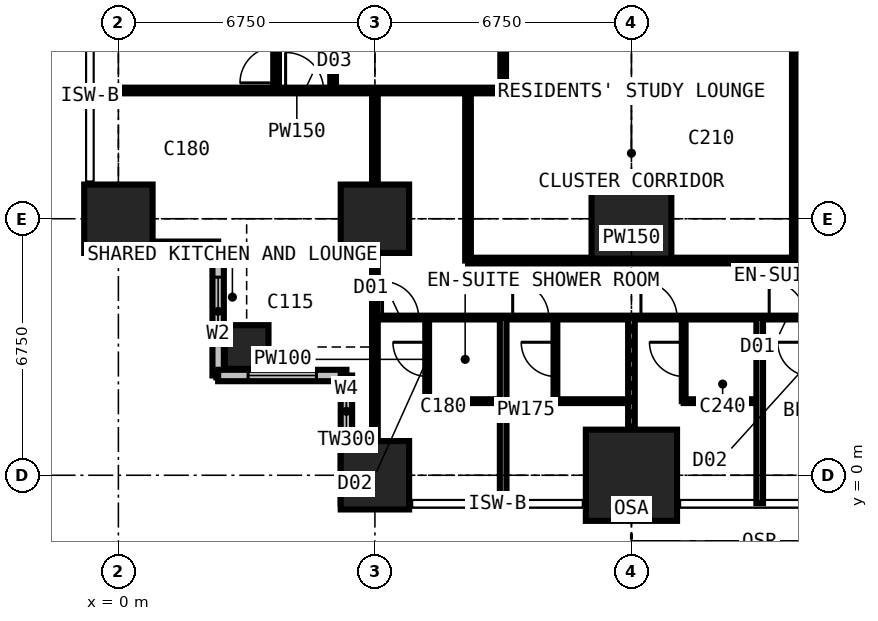
"""IFC4 building model, lengths in metres.
Left out: names, types, materials, properties, quantities, classifications, styles, units other than length and angle.
Written with IfcOpenShell. Run it as: python <this file> out.ifc"""

import sys

from ifc_helpers import new_model, si_unit, direction, frame, frame_2d, origin, origin_2d, place, context, subcontext, project, spatial, rectangle, extrude, element, fill, save


model = new_model("IFC4")
c1 = context("Model", 3, precision=1e-05, world=origin(), true_north=direction((0.0, 1.0)))
c2 = subcontext(c1, "Body", "Model", "MODEL_VIEW")
j1 = project(units=[si_unit("LENGTHUNIT", "METRE"), si_unit("PLANEANGLEUNIT", "RADIAN")], contexts=[c1])
p1 = place(None, origin())
s1 = spatial("IfcSite", under=j1, at=p1, CompositionType="ELEMENT")
p2 = place(p1, origin())
s2 = spatial("IfcBuilding", under=s1, at=p2, CompositionType="ELEMENT")
p3 = place(p2, frame((0.0, 0.0, 83.7)))
s3 = spatial("IfcBuildingStorey", under=s2, at=p3, CompositionType="ELEMENT", Elevation=83.7)
p4 = place(p3, frame((0.0, 6.75, 0.0), z_axis=(0.0, 0.0, 1.0), x_axis=(1.0, 0.0, 0.0)))
e1 = element("IfcColumn", 1, at=p4, inside=s3, PredefinedType="COLUMN", context=c2, shape_type="SweptSolid", body=[
    extrude(rectangle(XDim=1.8, YDim=1.8, at=origin_2d()), origin(), (0.0, 0.0, 1.0), 3.6),
])
p5 = place(p3, frame((3.375, 3.375, 0.0), z_axis=(0.0, 0.0, 1.0), x_axis=(1.0, 0.0, 0.0)))
e2 = element("IfcColumn", 2, at=p5, inside=s3, PredefinedType="COLUMN", context=c2, shape_type="SweptSolid", body=[
    extrude(rectangle(XDim=1.15, YDim=1.15, at=origin_2d()), origin(), (0.0, 0.0, 1.0), 3.6),
])
for number, where, z_axis, x_axis in (
    (3, (6.75, 0.0, 0.0), (0.0, 0.0, 1.0), (1.0, 0.0, 0.0)),
    (4, (6.75, 6.75, 0.0), (0.0, 0.0, 1.0), (1.0, 0.0, 0.0)),
):
    element("IfcColumn", number, at=place(p3, frame(where, z_axis=z_axis, x_axis=x_axis)), inside=s3, PredefinedType="COLUMN", context=c2, shape_type="SweptSolid", body=[
        extrude(rectangle(XDim=1.8, YDim=1.8, at=origin_2d()), origin(), (0.0, 0.0, 1.0), 3.6),
    ])
p6 = place(p3, frame((13.5, 0.0, 0.0), z_axis=(0.0, 0.0, 1.0), x_axis=(1.0, 0.0, 0.0)))
e5 = element("IfcColumn", 5, at=p6, inside=s3, PredefinedType="COLUMN", context=c2, shape_type="SweptSolid", body=[
    extrude(rectangle(XDim=2.4, YDim=2.4, at=origin_2d()), origin(), (0.0, 0.0, 1.0), 3.6),
])
p7 = place(p3, frame((13.5, 6.75, 0.0), z_axis=(0.0, 0.0, 1.0), x_axis=(1.0, 0.0, 0.0)))
e6 = element("IfcColumn", 6, at=p7, inside=s3, PredefinedType="COLUMN", context=c2, shape_type="SweptSolid", body=[
    extrude(rectangle(XDim=2.1, YDim=2.1, at=origin_2d()), origin(), (0.0, 0.0, 1.0), 3.6),
])
p8 = place(p3, frame((-0.75, 6.0, 0.0), z_axis=(0.0, 0.0, 1.0), x_axis=(1.0, 0.0, 0.0)))
e7 = element("IfcWall", 7, at=p8, inside=s3, PredefinedType="SOLIDWALL", context=c2, shape_type="SweptSolid", body=[
    extrude(rectangle(XDim=3.375, YDim=0.3, at=frame_2d((1.688, 0.0))), origin(), (0.0, 0.0, 1.0), 3.375),
])
p9 = place(p8, frame((1.833, 0.0, 0.9)))
e8 = element("IfcOpeningElement", 8, at=p9, cuts=e7, PredefinedType="OPENING", context=c2, shape_type="SweptSolid", body=[
    extrude(rectangle(XDim=1.2, YDim=1.8, at=frame_2d((0.6, 0.9))), frame((0.0, 0.16, 0.0), z_axis=(0.0, -1.0, 0.0), x_axis=(1.0, 0.0, 0.0)), (0.0, 0.0, 1.0), 0.32),
])
p10 = place(p3, frame((2.625, 6.0, 0.0), z_axis=(0.0, 0.0, 1.0), x_axis=(0.0, -1.0, 0.0)))
e9 = element("IfcWall", 9, at=p10, inside=s3, PredefinedType="SOLIDWALL", context=c2, shape_type="SweptSolid", body=[
    extrude(rectangle(XDim=3.375, YDim=0.3, at=frame_2d((1.688, 0.0))), origin(), (0.0, 0.0, 1.0), 3.375),
])
p11 = place(p10, frame((0.788, 0.0, 0.6)))
e10 = element("IfcOpeningElement", 10, at=p11, cuts=e9, PredefinedType="OPENING", context=c2, shape_type="SweptSolid", body=[
    extrude(rectangle(XDim=1.8, YDim=2.1, at=frame_2d((0.9, 1.05))), frame((0.0, 0.16, 0.0), z_axis=(0.0, -1.0, 0.0), x_axis=(1.0, 0.0, 0.0)), (0.0, 0.0, 1.0), 0.32),
])
p12 = place(p3, frame((2.625, 2.625, 0.0), z_axis=(0.0, 0.0, 1.0), x_axis=(1.0, 0.0, 0.0)))
e11 = element("IfcWall", 11, at=p12, inside=s3, PredefinedType="SOLIDWALL", context=c2, shape_type="SweptSolid", body=[
    extrude(rectangle(XDim=3.375, YDim=0.3, at=frame_2d((1.688, 0.0))), origin(), (0.0, 0.0, 1.0), 3.375),
])
p13 = place(p12, frame((0.788, 0.0, 0.6)))
e12 = element("IfcOpeningElement", 12, at=p13, cuts=e11, PredefinedType="OPENING", context=c2, shape_type="SweptSolid", body=[
    extrude(rectangle(XDim=1.8, YDim=2.1, at=frame_2d((0.9, 1.05))), frame((0.0, 0.16, 0.0), z_axis=(0.0, -1.0, 0.0), x_axis=(1.0, 0.0, 0.0)), (0.0, 0.0, 1.0), 0.32),
])
p14 = place(p3, frame((6.0, 2.625, 0.0), z_axis=(0.0, 0.0, 1.0), x_axis=(0.0, -1.0, 0.0)))
e13 = element("IfcWall", 13, at=p14, inside=s3, PredefinedType="SOLIDWALL", context=c2, shape_type="SweptSolid", body=[
    extrude(rectangle(XDim=3.375, YDim=0.3, at=frame_2d((1.688, 0.0))), origin(), (0.0, 0.0, 1.0), 3.375),
])
p15 = place(p14, frame((0.343, 0.0, 0.9)))
e14 = element("IfcOpeningElement", 14, at=p15, cuts=e13, PredefinedType="OPENING", context=c2, shape_type="SweptSolid", body=[
    extrude(rectangle(XDim=1.2, YDim=1.8, at=frame_2d((0.6, 0.9))), frame((0.0, 0.16, 0.0), z_axis=(0.0, -1.0, 0.0), x_axis=(1.0, 0.0, 0.0)), (0.0, 0.0, 1.0), 0.32),
])
p16 = place(p3, frame((-0.734, 10.125, 0.0), z_axis=(0.0, 0.0, 1.0), x_axis=(1.0, 0.0, 0.0)))
e15 = element("IfcWall", 15, at=p16, inside=s3, PredefinedType="PARTITIONING", context=c2, shape_type="SweptSolid", body=[
    extrude(rectangle(XDim=10.859, YDim=0.15, at=frame_2d((5.429, 0.0))), origin(), (0.0, 0.0, 1.0), 3.375),
])
p17 = place(p16, frame((5.134, 0.0, 0.0)))
e16 = element("IfcOpeningElement", 16, at=p17, cuts=e15, PredefinedType="OPENING", context=c2, shape_type="SweptSolid", body=[
    extrude(rectangle(XDim=1.0, YDim=2.2, at=frame_2d((0.5, 1.1))), frame((0.0, 0.085, 0.0), z_axis=(0.0, -1.0, 0.0), x_axis=(1.0, 0.0, 0.0)), (0.0, 0.0, 1.0), 0.17),
])
p18 = place(p3, frame((4.15, 10.125, 0.0), z_axis=(0.0, 0.0, 1.0), x_axis=(0.0, 1.0, 0.0)))
e17 = element("IfcWall", 17, at=p18, inside=s3, PredefinedType="PARTITIONING", context=c2, shape_type="SweptSolid", body=[
    extrude(rectangle(XDim=16.875, YDim=0.15, at=frame_2d((8.438, 0.0))), origin(), (0.0, 0.0, 1.0), 3.375),
])
p19 = place(p18, frame((13.7, 0.0, 0.0)))
e18 = element("IfcOpeningElement", 18, at=p19, cuts=e17, PredefinedType="OPENING", context=c2, shape_type="SweptSolid", body=[
    extrude(rectangle(XDim=0.95, YDim=2.2, at=frame_2d((0.475, 1.1))), frame((0.0, 0.085, 0.0), z_axis=(0.0, -1.0, 0.0), x_axis=(1.0, 0.0, 0.0)), (0.0, 0.0, 1.0), 0.17),
])
p20 = place(p18, frame((7.575, 0.0, 0.0)))
e19 = element("IfcOpeningElement", 19, at=p20, cuts=e17, PredefinedType="OPENING", context=c2, shape_type="SweptSolid", body=[
    extrude(rectangle(XDim=0.95, YDim=2.2, at=frame_2d((0.475, 1.1))), frame((0.0, 0.085, 0.0), z_axis=(0.0, -1.0, 0.0), x_axis=(1.0, 0.0, 0.0)), (0.0, 0.0, 1.0), 0.17),
])
p21 = place(p18, frame((0.2, 0.0, 0.0)))
e20 = element("IfcOpeningElement", 20, at=p21, cuts=e17, PredefinedType="OPENING", context=c2, shape_type="SweptSolid", body=[
    extrude(rectangle(XDim=0.95, YDim=2.2, at=frame_2d((0.475, 1.1))), frame((0.0, 0.085, 0.0), z_axis=(0.0, -1.0, 0.0), x_axis=(1.0, 0.0, 0.0)), (0.0, 0.0, 1.0), 0.17),
])
p22 = place(p18, frame((10.375, 0.0, 0.0)))
e21 = element("IfcOpeningElement", 21, at=p22, cuts=e17, PredefinedType="OPENING", context=c2, shape_type="SweptSolid", body=[
    extrude(rectangle(XDim=0.95, YDim=2.2, at=frame_2d((0.475, 1.1))), frame((0.0, 0.085, 0.0), z_axis=(0.0, -1.0, 0.0), x_axis=(1.0, 0.0, 0.0)), (0.0, 0.0, 1.0), 0.17),
])
p23 = place(p3, frame((5.65, 10.125, 0.0), z_axis=(0.0, 0.0, 1.0), x_axis=(0.0, 1.0, 0.0)))
e22 = element("IfcWall", 22, at=p23, inside=s3, PredefinedType="PARTITIONING", context=c2, shape_type="SweptSolid", body=[
    extrude(rectangle(XDim=10.762, YDim=0.15, at=frame_2d((5.381, 0.0))), origin(), (0.0, 0.0, 1.0), 3.375),
])
p24 = place(p23, frame((4.9, 0.0, 0.0)))
e23 = element("IfcOpeningElement", 23, at=p24, cuts=e22, PredefinedType="OPENING", context=c2, shape_type="SweptSolid", body=[
    extrude(rectangle(XDim=0.95, YDim=2.2, at=frame_2d((0.475, 1.1))), frame((0.0, 0.085, 0.0), z_axis=(0.0, -1.0, 0.0), x_axis=(1.0, 0.0, 0.0)), (0.0, 0.0, 1.0), 0.17),
])
p25 = place(p3, frame((6.75, -0.734, 0.0), z_axis=(0.0, 0.0, 1.0), x_axis=(0.0, 1.0, 0.0)))
e24 = element("IfcWall", 24, at=p25, inside=s3, PredefinedType="PARTITIONING", context=c2, shape_type="SweptSolid", body=[
    extrude(rectangle(XDim=10.859, YDim=0.15, at=frame_2d((5.429, 0.0))), origin(), (0.0, 0.0, 1.0), 2.877),
])
p26 = place(p3, frame((6.75, 4.15, 0.0), z_axis=(0.0, 0.0, 1.0), x_axis=(1.0, 0.0, 0.0)))
e25 = element("IfcWall", 25, at=p26, inside=s3, PredefinedType="PARTITIONING", context=c2, shape_type="SweptSolid", body=[
    extrude(rectangle(XDim=23.625, YDim=0.1, at=frame_2d((11.812, 0.0))), origin(), (0.0, 0.0, 1.0), 3.375),
])
p27 = place(p26, frame((0.2, 0.0, 0.0)))
e26 = element("IfcOpeningElement", 26, at=p27, cuts=e25, PredefinedType="OPENING", context=c2, shape_type="SweptSolid", body=[
    extrude(rectangle(XDim=0.95, YDim=2.2, at=frame_2d((0.475, 1.1))), frame((0.0, 0.06, 0.0), z_axis=(0.0, -1.0, 0.0), x_axis=(1.0, 0.0, 0.0)), (0.0, 0.0, 1.0), 0.12),
])
p28 = place(p26, frame((3.625, 0.0, 0.0)))
e27 = element("IfcOpeningElement", 27, at=p28, cuts=e25, PredefinedType="OPENING", context=c2, shape_type="SweptSolid", body=[
    extrude(rectangle(XDim=0.95, YDim=2.2, at=frame_2d((0.475, 1.1))), frame((0.0, 0.06, 0.0), z_axis=(0.0, -1.0, 0.0), x_axis=(1.0, 0.0, 0.0)), (0.0, 0.0, 1.0), 0.12),
])
p29 = place(p26, frame((7.0, 0.0, 0.0)))
e28 = element("IfcOpeningElement", 28, at=p29, cuts=e25, PredefinedType="OPENING", context=c2, shape_type="SweptSolid", body=[
    extrude(rectangle(XDim=0.95, YDim=2.2, at=frame_2d((0.475, 1.1))), frame((0.0, 0.06, 0.0), z_axis=(0.0, -1.0, 0.0), x_axis=(1.0, 0.0, 0.0)), (0.0, 0.0, 1.0), 0.12),
])
p30 = place(p26, frame((10.375, 0.0, 0.0)))
e29 = element("IfcOpeningElement", 29, at=p30, cuts=e25, PredefinedType="OPENING", context=c2, shape_type="SweptSolid", body=[
    extrude(rectangle(XDim=0.95, YDim=2.2, at=frame_2d((0.475, 1.1))), frame((0.0, 0.06, 0.0), z_axis=(0.0, -1.0, 0.0), x_axis=(1.0, 0.0, 0.0)), (0.0, 0.0, 1.0), 0.12),
])
p31 = place(p26, frame((15.1, 0.0, 0.0)))
e30 = element("IfcOpeningElement", 30, at=p31, cuts=e25, PredefinedType="OPENING", context=c2, shape_type="SweptSolid", body=[
    extrude(rectangle(XDim=0.95, YDim=2.2, at=frame_2d((0.475, 1.1))), frame((0.0, 0.06, 0.0), z_axis=(0.0, -1.0, 0.0), x_axis=(1.0, 0.0, 0.0)), (0.0, 0.0, 1.0), 0.12),
])
p32 = place(p26, frame((20.5, 0.0, 0.0)))
e31 = element("IfcOpeningElement", 31, at=p32, cuts=e25, PredefinedType="OPENING", context=c2, shape_type="SweptSolid", body=[
    extrude(rectangle(XDim=0.95, YDim=2.2, at=frame_2d((0.475, 1.1))), frame((0.0, 0.06, 0.0), z_axis=(0.0, -1.0, 0.0), x_axis=(1.0, 0.0, 0.0)), (0.0, 0.0, 1.0), 0.12),
])
p33 = place(p3, frame((8.125, 1.95, 0.0), z_axis=(0.0, 0.0, 1.0), x_axis=(0.0, 1.0, 0.0)))
e32 = element("IfcWall", 32, at=p33, inside=s3, PredefinedType="PARTITIONING", context=c2, shape_type="SweptSolid", body=[
    extrude(rectangle(XDim=2.2, YDim=0.1, at=frame_2d((1.1, 0.0))), origin(), (0.0, 0.0, 1.0), 3.375),
])
p34 = place(p33, frame((0.65, 0.0, 0.0)))
e33 = element("IfcOpeningElement", 33, at=p34, cuts=e32, PredefinedType="OPENING", context=c2, shape_type="SweptSolid", body=[
    extrude(rectangle(XDim=0.9, YDim=2.2, at=frame_2d((0.45, 1.1))), frame((0.0, 0.06, 0.0), z_axis=(0.0, -1.0, 0.0), x_axis=(1.0, 0.0, 0.0)), (0.0, 0.0, 1.0), 0.12),
])
p35 = place(p3, frame((8.125, 1.95, 0.0), z_axis=(0.0, 0.0, 1.0), x_axis=(1.0, 0.0, 0.0)))
e34 = element("IfcWall", 34, at=p35, inside=s3, PredefinedType="PARTITIONING", context=c2, shape_type="SweptSolid", body=[
    extrude(rectangle(XDim=2.0, YDim=0.1, at=frame_2d((1.0, 0.0))), origin(), (0.0, 0.0, 1.0), 3.375),
])
p36 = place(p3, frame((9.2, 5.65, 0.0), z_axis=(0.0, 0.0, 1.0), x_axis=(0.0, 1.0, 0.0)))
e35 = element("IfcWall", 35, at=p36, inside=s3, PredefinedType="PARTITIONING", context=c2, shape_type="SweptSolid", body=[
    extrude(rectangle(XDim=4.475, YDim=0.15, at=frame_2d((2.238, 0.0))), origin(), (0.0, 0.0, 1.0), 3.375),
])
p37 = place(p3, frame((9.2, 5.65, 0.0), z_axis=(0.0, 0.0, 1.0), x_axis=(1.0, 0.0, 0.0)))
e36 = element("IfcWall", 36, at=p37, inside=s3, PredefinedType="PARTITIONING", context=c2, shape_type="SweptSolid", body=[
    extrude(rectangle(XDim=8.6, YDim=0.15, at=frame_2d((4.3, 0.0))), origin(), (0.0, 0.0, 1.0), 3.375),
])
p38 = place(p3, frame((10.125, -0.734, 0.0), z_axis=(0.0, 0.0, 1.0), x_axis=(0.0, 1.0, 0.0)))
e37 = element("IfcWall", 37, at=p38, inside=s3, PredefinedType="PARTITIONING", context=c2, shape_type="SweptSolid", body=[
    extrude(rectangle(XDim=4.884, YDim=0.175, at=frame_2d((2.442, 0.0))), origin(), (0.0, 0.0, 1.0), 3.375),
])
p39 = place(p3, frame((10.125, 10.125, 0.0), z_axis=(0.0, 0.0, 1.0), x_axis=(0.0, 1.0, 0.0)))
e38 = element("IfcWall", 38, at=p39, inside=s3, PredefinedType="PARTITIONING", context=c2, shape_type="SweptSolid", body=[
    extrude(rectangle(XDim=1.175, YDim=0.15, at=frame_2d((0.587, 0.0))), origin(), (0.0, 0.0, 1.0), 3.375),
])
p40 = place(p3, frame((11.5, 1.95, 0.0), z_axis=(0.0, 0.0, 1.0), x_axis=(0.0, 1.0, 0.0)))
e39 = element("IfcWall", 39, at=p40, inside=s3, PredefinedType="PARTITIONING", context=c2, shape_type="SweptSolid", body=[
    extrude(rectangle(XDim=2.2, YDim=0.1, at=frame_2d((1.1, 0.0))), origin(), (0.0, 0.0, 1.0), 3.375),
])
p41 = place(p40, frame((0.65, 0.0, 0.0)))
e40 = element("IfcOpeningElement", 40, at=p41, cuts=e39, PredefinedType="OPENING", context=c2, shape_type="SweptSolid", body=[
    extrude(rectangle(XDim=0.9, YDim=2.2, at=frame_2d((0.45, 1.1))), frame((0.0, 0.06, 0.0), z_axis=(0.0, -1.0, 0.0), x_axis=(1.0, 0.0, 0.0)), (0.0, 0.0, 1.0), 0.12),
])
p42 = place(p3, frame((11.5, 1.95, 0.0), z_axis=(0.0, 0.0, 1.0), x_axis=(1.0, 0.0, 0.0)))
e41 = element("IfcWall", 41, at=p42, inside=s3, PredefinedType="PARTITIONING", context=c2, shape_type="SweptSolid", body=[
    extrude(rectangle(XDim=2.0, YDim=0.1, at=frame_2d((1.0, 0.0))), origin(), (0.0, 0.0, 1.0), 3.375),
])
p43 = place(p3, frame((13.5, -0.734, 0.0), z_axis=(0.0, 0.0, 1.0), x_axis=(0.0, 1.0, 0.0)))
e42 = element("IfcWall", 42, at=p43, inside=s3, PredefinedType="PARTITIONING", context=c2, shape_type="SweptSolid", body=[
    extrude(rectangle(XDim=4.884, YDim=0.175, at=frame_2d((2.442, 0.0))), origin(), (0.0, 0.0, 1.0), 2.61),
])
p44 = place(p3, frame((14.875, 1.95, 0.0), z_axis=(0.0, 0.0, 1.0), x_axis=(0.0, 1.0, 0.0)))
e43 = element("IfcWall", 43, at=p44, inside=s3, PredefinedType="PARTITIONING", context=c2, shape_type="SweptSolid", body=[
    extrude(rectangle(XDim=2.2, YDim=0.1, at=frame_2d((1.1, 0.0))), origin(), (0.0, 0.0, 1.0), 3.375),
])
p45 = place(p44, frame((0.65, 0.0, 0.0)))
e44 = element("IfcOpeningElement", 44, at=p45, cuts=e43, PredefinedType="OPENING", context=c2, shape_type="SweptSolid", body=[
    extrude(rectangle(XDim=0.9, YDim=2.2, at=frame_2d((0.45, 1.1))), frame((0.0, 0.06, 0.0), z_axis=(0.0, -1.0, 0.0), x_axis=(1.0, 0.0, 0.0)), (0.0, 0.0, 1.0), 0.12),
])
p46 = place(p3, frame((14.875, 1.95, 0.0), z_axis=(0.0, 0.0, 1.0), x_axis=(1.0, 0.0, 0.0)))
e45 = element("IfcWall", 45, at=p46, inside=s3, PredefinedType="PARTITIONING", context=c2, shape_type="SweptSolid", body=[
    extrude(rectangle(XDim=2.0, YDim=0.1, at=frame_2d((1.0, 0.0))), origin(), (0.0, 0.0, 1.0), 3.375),
])
p47 = place(p3, frame((16.875, -0.734, 0.0), z_axis=(0.0, 0.0, 1.0), x_axis=(0.0, 1.0, 0.0)))
e46 = element("IfcWall", 46, at=p47, inside=s3, PredefinedType="PARTITIONING", context=c2, shape_type="SweptSolid", body=[
    extrude(rectangle(XDim=4.884, YDim=0.175, at=frame_2d((2.442, 0.0))), origin(), (0.0, 0.0, 1.0), 3.375),
])
p48 = place(p3, frame((17.8, 5.65, 0.0), z_axis=(0.0, 0.0, 1.0), x_axis=(0.0, 1.0, 0.0)))
e47 = element("IfcWall", 47, at=p48, inside=s3, PredefinedType="PARTITIONING", context=c2, shape_type="SweptSolid", body=[
    extrude(rectangle(XDim=5.65, YDim=0.15, at=frame_2d((2.825, 0.0))), origin(), (0.0, 0.0, 1.0), 3.375),
])
p49 = place(p9, origin())
e48 = element("IfcWindow", 48, at=p49, inside=s3, PartitioningType="SINGLE_PANEL", PredefinedType="WINDOW", context=c2, shape_type="SweptSolid", body=[
    extrude(rectangle(XDim=1.2, YDim=1.8, at=frame_2d((0.6, 0.9))), frame((0.0, 0.03, 0.0), z_axis=(0.0, -1.0, 0.0), x_axis=(1.0, 0.0, 0.0)), (0.0, 0.0, 1.0), 0.06),
])
fill(e8, e48)
p50 = place(p11, origin())
e49 = element("IfcWindow", 49, at=p50, inside=s3, PartitioningType="SINGLE_PANEL", PredefinedType="WINDOW", context=c2, shape_type="SweptSolid", body=[
    extrude(rectangle(XDim=1.8, YDim=2.1, at=frame_2d((0.9, 1.05))), frame((0.0, 0.03, 0.0), z_axis=(0.0, -1.0, 0.0), x_axis=(1.0, 0.0, 0.0)), (0.0, 0.0, 1.0), 0.06),
])
fill(e10, e49)
p51 = place(p13, origin())
e50 = element("IfcWindow", 50, at=p51, inside=s3, PartitioningType="SINGLE_PANEL", PredefinedType="WINDOW", context=c2, shape_type="SweptSolid", body=[
    extrude(rectangle(XDim=1.8, YDim=2.1, at=frame_2d((0.9, 1.05))), frame((0.0, 0.03, 0.0), z_axis=(0.0, -1.0, 0.0), x_axis=(1.0, 0.0, 0.0)), (0.0, 0.0, 1.0), 0.06),
])
fill(e12, e50)
p52 = place(p15, origin())
e51 = element("IfcWindow", 51, at=p52, inside=s3, PartitioningType="SINGLE_PANEL", PredefinedType="WINDOW", context=c2, shape_type="SweptSolid", body=[
    extrude(rectangle(XDim=1.2, YDim=1.8, at=frame_2d((0.6, 0.9))), frame((0.0, 0.03, 0.0), z_axis=(0.0, -1.0, 0.0), x_axis=(1.0, 0.0, 0.0)), (0.0, 0.0, 1.0), 0.06),
])
fill(e14, e51)
p53 = place(p17, origin())
e52 = element("IfcDoor", 52, at=p53, inside=s3, OperationType="SINGLE_SWING_LEFT", PredefinedType="DOOR", context=c2, shape_type="SweptSolid", body=[
    extrude(rectangle(XDim=1.0, YDim=2.2, at=frame_2d((0.5, 1.1))), frame((0.0, 0.025, 0.0), z_axis=(0.0, -1.0, 0.0), x_axis=(1.0, 0.0, 0.0)), (0.0, 0.0, 1.0), 0.05),
])
fill(e16, e52)
p54 = place(p27, origin())
e53 = element("IfcDoor", 53, at=p54, inside=s3, OperationType="SINGLE_SWING_LEFT", PredefinedType="DOOR", context=c2, shape_type="SweptSolid", body=[
    extrude(rectangle(XDim=0.95, YDim=2.2, at=frame_2d((0.475, 1.1))), frame((0.0, 0.025, 0.0), z_axis=(0.0, -1.0, 0.0), x_axis=(1.0, 0.0, 0.0)), (0.0, 0.0, 1.0), 0.05),
])
fill(e26, e53)
p55 = place(p34, origin())
e54 = element("IfcDoor", 54, at=p55, inside=s3, OperationType="SINGLE_SWING_RIGHT", PredefinedType="DOOR", context=c2, shape_type="SweptSolid", body=[
    extrude(rectangle(XDim=0.9, YDim=2.2, at=frame_2d((0.45, 1.1))), frame((0.0, 0.025, 0.0), z_axis=(0.0, -1.0, 0.0), x_axis=(1.0, 0.0, 0.0)), (0.0, 0.0, 1.0), 0.05),
])
fill(e33, e54)
p56 = place(p28, origin())
e55 = element("IfcDoor", 55, at=p56, inside=s3, OperationType="SINGLE_SWING_LEFT", PredefinedType="DOOR", context=c2, shape_type="SweptSolid", body=[
    extrude(rectangle(XDim=0.95, YDim=2.2, at=frame_2d((0.475, 1.1))), frame((0.0, 0.025, 0.0), z_axis=(0.0, -1.0, 0.0), x_axis=(1.0, 0.0, 0.0)), (0.0, 0.0, 1.0), 0.05),
])
fill(e27, e55)
p57 = place(p41, origin())
e56 = element("IfcDoor", 56, at=p57, inside=s3, OperationType="SINGLE_SWING_RIGHT", PredefinedType="DOOR", context=c2, shape_type="SweptSolid", body=[
    extrude(rectangle(XDim=0.9, YDim=2.2, at=frame_2d((0.45, 1.1))), frame((0.0, 0.025, 0.0), z_axis=(0.0, -1.0, 0.0), x_axis=(1.0, 0.0, 0.0)), (0.0, 0.0, 1.0), 0.05),
])
fill(e40, e56)
p58 = place(p29, origin())
e57 = element("IfcDoor", 57, at=p58, inside=s3, OperationType="SINGLE_SWING_LEFT", PredefinedType="DOOR", context=c2, shape_type="SweptSolid", body=[
    extrude(rectangle(XDim=0.95, YDim=2.2, at=frame_2d((0.475, 1.1))), frame((0.0, 0.025, 0.0), z_axis=(0.0, -1.0, 0.0), x_axis=(1.0, 0.0, 0.0)), (0.0, 0.0, 1.0), 0.05),
])
fill(e28, e57)
p59 = place(p45, origin())
e58 = element("IfcDoor", 58, at=p59, inside=s3, OperationType="SINGLE_SWING_RIGHT", PredefinedType="DOOR", context=c2, shape_type="SweptSolid", body=[
    extrude(rectangle(XDim=0.9, YDim=2.2, at=frame_2d((0.45, 1.1))), frame((0.0, 0.025, 0.0), z_axis=(0.0, -1.0, 0.0), x_axis=(1.0, 0.0, 0.0)), (0.0, 0.0, 1.0), 0.05),
])
fill(e44, e58)
p60 = place(p30, origin())
e59 = element("IfcDoor", 59, at=p60, inside=s3, OperationType="SINGLE_SWING_LEFT", PredefinedType="DOOR", context=c2, shape_type="SweptSolid", body=[
    extrude(rectangle(XDim=0.95, YDim=2.2, at=frame_2d((0.475, 1.1))), frame((0.0, 0.025, 0.0), z_axis=(0.0, -1.0, 0.0), x_axis=(1.0, 0.0, 0.0)), (0.0, 0.0, 1.0), 0.05),
])
fill(e29, e59)
p61 = place(p21, origin())
e60 = element("IfcDoor", 60, at=p61, inside=s3, OperationType="SINGLE_SWING_LEFT", PredefinedType="DOOR", context=c2, shape_type="SweptSolid", body=[
    extrude(rectangle(XDim=0.95, YDim=2.2, at=frame_2d((0.475, 1.1))), frame((0.0, 0.025, 0.0), z_axis=(0.0, -1.0, 0.0), x_axis=(1.0, 0.0, 0.0)), (0.0, 0.0, 1.0), 0.05),
])
fill(e20, e60)
save(model, sys.argv[1])
